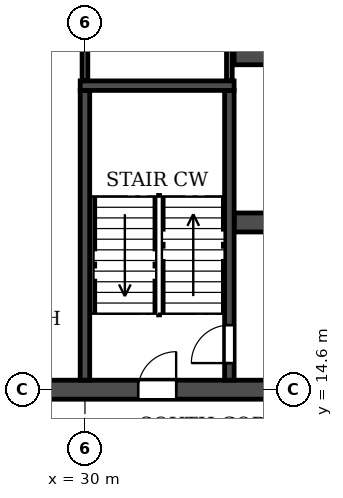
"""IFC4 building model, lengths in metres.
Left out: names, types, materials, properties, quantities, classifications, styles, units other than length and angle.
Written with IfcOpenShell. Run it as: python <this file> out.ifc"""

import sys

from ifc_helpers import new_model, si_unit, direction, frame, frame_2d, origin, place, context, subcontext, project, spatial, rectangle, extrude, element, fill, save


model = new_model("IFC4")
c1 = context("Model", 3, precision=1e-05, world=origin(), true_north=direction((0.0, 1.0)))
c2 = subcontext(c1, "Body", "Model", "MODEL_VIEW")
j1 = project(units=[si_unit("LENGTHUNIT", "METRE"), si_unit("PLANEANGLEUNIT", "RADIAN")], contexts=[c1])
p1 = place(None, origin())
s1 = spatial("IfcSite", under=j1, at=p1, CompositionType="ELEMENT")
p2 = place(p1, origin())
s2 = spatial("IfcBuilding", under=s1, at=p2, CompositionType="ELEMENT")
p3 = place(p2, frame((0.0, 0.0, 72.9)))
s3 = spatial("IfcBuildingStorey", under=s2, at=p3, CompositionType="ELEMENT", Elevation=72.9)
p4 = place(p3, frame((8.6, 14.6, 0.0), z_axis=(0.0, 0.0, 1.0), x_axis=(1.0, 0.0, 0.0)))
e1 = element("IfcWall", 1, at=p4, inside=s3, PredefinedType="SOLIDWALL", context=c2, shape_type="SweptSolid", body=[
    extrude(rectangle(XDim=84.8, YDim=0.5, at=frame_2d((42.4, 0.0))), origin(), (0.0, 0.0, 1.0), 3.06),
])
p5 = place(p4, frame((2.25, 0.0, 0.0)))
e2 = element("IfcOpeningElement", 2, at=p5, cuts=e1, PredefinedType="OPENING", context=c2, shape_type="SweptSolid", body=[
    extrude(rectangle(XDim=1.0, YDim=2.1, at=frame_2d((0.5, 1.05))), frame((0.0, 0.26, 0.0), z_axis=(0.0, -1.0, 0.0), x_axis=(1.0, 0.0, 0.0)), (0.0, 0.0, 1.0), 0.52),
])
p6 = place(p4, frame((6.95, 0.0, 0.0)))
e3 = element("IfcOpeningElement", 3, at=p6, cuts=e1, PredefinedType="OPENING", context=c2, shape_type="SweptSolid", body=[
    extrude(rectangle(XDim=1.0, YDim=2.1, at=frame_2d((0.5, 1.05))), frame((0.0, 0.26, 0.0), z_axis=(0.0, -1.0, 0.0), x_axis=(1.0, 0.0, 0.0)), (0.0, 0.0, 1.0), 0.52),
])
p7 = place(p4, frame((10.3, 0.0, 0.0)))
e4 = element("IfcOpeningElement", 4, at=p7, cuts=e1, PredefinedType="OPENING", context=c2, shape_type="SweptSolid", body=[
    extrude(rectangle(XDim=1.0, YDim=2.1, at=frame_2d((0.5, 1.05))), frame((0.0, 0.26, 0.0), z_axis=(0.0, -1.0, 0.0), x_axis=(1.0, 0.0, 0.0)), (0.0, 0.0, 1.0), 0.52),
])
p8 = place(p4, frame((18.2, 0.0, 0.0)))
e5 = element("IfcOpeningElement", 5, at=p8, cuts=e1, PredefinedType="OPENING", context=c2, shape_type="SweptSolid", body=[
    extrude(rectangle(XDim=1.0, YDim=2.1, at=frame_2d((0.5, 1.05))), frame((0.0, 0.26, 0.0), z_axis=(0.0, -1.0, 0.0), x_axis=(1.0, 0.0, 0.0)), (0.0, 0.0, 1.0), 0.52),
])
p9 = place(p4, frame((22.8, 0.0, 0.0)))
e6 = element("IfcOpeningElement", 6, at=p9, cuts=e1, PredefinedType="OPENING", context=c2, shape_type="SweptSolid", body=[
    extrude(rectangle(XDim=1.0, YDim=2.1, at=frame_2d((0.5, 1.05))), frame((0.0, 0.26, 0.0), z_axis=(0.0, -1.0, 0.0), x_axis=(1.0, 0.0, 0.0)), (0.0, 0.0, 1.0), 0.52),
])
p10 = place(p4, frame((35.4, 0.0, 0.0)))
e7 = element("IfcOpeningElement", 7, at=p10, cuts=e1, PredefinedType="OPENING", context=c2, shape_type="SweptSolid", body=[
    extrude(rectangle(XDim=1.0, YDim=2.1, at=frame_2d((0.5, 1.05))), frame((0.0, 0.26, 0.0), z_axis=(0.0, -1.0, 0.0), x_axis=(1.0, 0.0, 0.0)), (0.0, 0.0, 1.0), 0.52),
])
p11 = place(p4, frame((39.3, 0.0, 0.0)))
e8 = element("IfcOpeningElement", 8, at=p11, cuts=e1, PredefinedType="OPENING", context=c2, shape_type="SweptSolid", body=[
    extrude(rectangle(XDim=1.0, YDim=2.1, at=frame_2d((0.5, 1.05))), frame((0.0, 0.26, 0.0), z_axis=(0.0, -1.0, 0.0), x_axis=(1.0, 0.0, 0.0)), (0.0, 0.0, 1.0), 0.52),
])
p12 = place(p4, frame((41.9, 0.0, 0.0)))
e9 = element("IfcOpeningElement", 9, at=p12, cuts=e1, PredefinedType="OPENING", context=c2, shape_type="SweptSolid", body=[
    extrude(rectangle(XDim=1.0, YDim=2.1, at=frame_2d((0.5, 1.05))), frame((0.0, 0.26, 0.0), z_axis=(0.0, -1.0, 0.0), x_axis=(1.0, 0.0, 0.0)), (0.0, 0.0, 1.0), 0.52),
])
p13 = place(p4, frame((44.5, 0.0, 0.0)))
e10 = element("IfcOpeningElement", 10, at=p13, cuts=e1, PredefinedType="OPENING", context=c2, shape_type="SweptSolid", body=[
    extrude(rectangle(XDim=1.0, YDim=2.1, at=frame_2d((0.5, 1.05))), frame((0.0, 0.26, 0.0), z_axis=(0.0, -1.0, 0.0), x_axis=(1.0, 0.0, 0.0)), (0.0, 0.0, 1.0), 0.52),
])
p14 = place(p4, frame((48.4, 0.0, 0.0)))
e11 = element("IfcOpeningElement", 11, at=p14, cuts=e1, PredefinedType="OPENING", context=c2, shape_type="SweptSolid", body=[
    extrude(rectangle(XDim=1.0, YDim=2.1, at=frame_2d((0.5, 1.05))), frame((0.0, 0.26, 0.0), z_axis=(0.0, -1.0, 0.0), x_axis=(1.0, 0.0, 0.0)), (0.0, 0.0, 1.0), 0.52),
])
p15 = place(p4, frame((61.0, 0.0, 0.0)))
e12 = element("IfcOpeningElement", 12, at=p15, cuts=e1, PredefinedType="OPENING", context=c2, shape_type="SweptSolid", body=[
    extrude(rectangle(XDim=1.0, YDim=2.1, at=frame_2d((0.5, 1.05))), frame((0.0, 0.26, 0.0), z_axis=(0.0, -1.0, 0.0), x_axis=(1.0, 0.0, 0.0)), (0.0, 0.0, 1.0), 0.52),
])
p16 = place(p4, frame((65.6, 0.0, 0.0)))
e13 = element("IfcOpeningElement", 13, at=p16, cuts=e1, PredefinedType="OPENING", context=c2, shape_type="SweptSolid", body=[
    extrude(rectangle(XDim=1.0, YDim=2.1, at=frame_2d((0.5, 1.05))), frame((0.0, 0.26, 0.0), z_axis=(0.0, -1.0, 0.0), x_axis=(1.0, 0.0, 0.0)), (0.0, 0.0, 1.0), 0.52),
])
p17 = place(p4, frame((73.5, 0.0, 0.0)))
e14 = element("IfcOpeningElement", 14, at=p17, cuts=e1, PredefinedType="OPENING", context=c2, shape_type="SweptSolid", body=[
    extrude(rectangle(XDim=1.0, YDim=2.1, at=frame_2d((0.5, 1.05))), frame((0.0, 0.26, 0.0), z_axis=(0.0, -1.0, 0.0), x_axis=(1.0, 0.0, 0.0)), (0.0, 0.0, 1.0), 0.52),
])
p18 = place(p4, frame((76.55, 0.0, 0.0)))
e15 = element("IfcOpeningElement", 15, at=p18, cuts=e1, PredefinedType="OPENING", context=c2, shape_type="SweptSolid", body=[
    extrude(rectangle(XDim=1.0, YDim=2.1, at=frame_2d((0.5, 1.05))), frame((0.0, 0.26, 0.0), z_axis=(0.0, -1.0, 0.0), x_axis=(1.0, 0.0, 0.0)), (0.0, 0.0, 1.0), 0.52),
])
p19 = place(p4, frame((81.0, 0.0, 0.0)))
e16 = element("IfcOpeningElement", 16, at=p19, cuts=e1, PredefinedType="OPENING", context=c2, shape_type="SweptSolid", body=[
    extrude(rectangle(XDim=1.5, YDim=2.1, at=frame_2d((0.75, 1.05))), frame((0.0, 0.26, 0.0), z_axis=(0.0, -1.0, 0.0), x_axis=(1.0, 0.0, 0.0)), (0.0, 0.0, 1.0), 0.52),
])
p20 = place(p3, frame((33.925, 19.0, 0.0), z_axis=(0.0, 0.0, 1.0), x_axis=(1.0, 0.0, 0.0)))
e17 = element("IfcWall", 17, at=p20, inside=s3, PredefinedType="SOLIDWALL", context=c2, shape_type="SweptSolid", body=[
    extrude(rectangle(XDim=34.15, YDim=0.5, at=frame_2d((17.075, 0.0))), origin(), (0.0, 0.0, 1.0), 3.06),
])
p21 = place(p20, frame((16.175, 0.0, 0.0)))
e18 = element("IfcOpeningElement", 18, at=p21, cuts=e17, PredefinedType="OPENING", context=c2, shape_type="SweptSolid", body=[
    extrude(rectangle(XDim=1.8, YDim=2.1, at=frame_2d((0.9, 1.05))), frame((0.0, 0.26, 0.0), z_axis=(0.0, -1.0, 0.0), x_axis=(1.0, 0.0, 0.0)), (0.0, 0.0, 1.0), 0.52),
])
p22 = place(p20, frame((1.525, 0.0, 0.0)))
e19 = element("IfcOpeningElement", 19, at=p22, cuts=e17, PredefinedType="OPENING", context=c2, shape_type="SweptSolid", body=[
    extrude(rectangle(XDim=1.8, YDim=2.1, at=frame_2d((0.9, 1.05))), frame((0.0, 0.26, 0.0), z_axis=(0.0, -1.0, 0.0), x_axis=(1.0, 0.0, 0.0)), (0.0, 0.0, 1.0), 0.52),
])
p23 = place(p20, frame((8.725, 0.0, 0.0)))
e20 = element("IfcOpeningElement", 20, at=p23, cuts=e17, PredefinedType="OPENING", context=c2, shape_type="SweptSolid", body=[
    extrude(rectangle(XDim=1.1, YDim=2.1, at=frame_2d((0.55, 1.05))), frame((0.0, 0.26, 0.0), z_axis=(0.0, -1.0, 0.0), x_axis=(1.0, 0.0, 0.0)), (0.0, 0.0, 1.0), 0.52),
])
p24 = place(p20, frame((11.325, 0.0, 0.0)))
e21 = element("IfcOpeningElement", 21, at=p24, cuts=e17, PredefinedType="OPENING", context=c2, shape_type="SweptSolid", body=[
    extrude(rectangle(XDim=1.1, YDim=2.1, at=frame_2d((0.55, 1.05))), frame((0.0, 0.26, 0.0), z_axis=(0.0, -1.0, 0.0), x_axis=(1.0, 0.0, 0.0)), (0.0, 0.0, 1.0), 0.52),
])
p25 = place(p20, frame((13.925, 0.0, 0.0)))
e22 = element("IfcOpeningElement", 22, at=p25, cuts=e17, PredefinedType="OPENING", context=c2, shape_type="SweptSolid", body=[
    extrude(rectangle(XDim=1.1, YDim=2.1, at=frame_2d((0.55, 1.05))), frame((0.0, 0.26, 0.0), z_axis=(0.0, -1.0, 0.0), x_axis=(1.0, 0.0, 0.0)), (0.0, 0.0, 1.0), 0.52),
])
p26 = place(p20, frame((19.125, 0.0, 0.0)))
e23 = element("IfcOpeningElement", 23, at=p26, cuts=e17, PredefinedType="OPENING", context=c2, shape_type="SweptSolid", body=[
    extrude(rectangle(XDim=1.1, YDim=2.1, at=frame_2d((0.55, 1.05))), frame((0.0, 0.26, 0.0), z_axis=(0.0, -1.0, 0.0), x_axis=(1.0, 0.0, 0.0)), (0.0, 0.0, 1.0), 0.52),
])
p27 = place(p20, frame((21.725, 0.0, 0.0)))
e24 = element("IfcOpeningElement", 24, at=p27, cuts=e17, PredefinedType="OPENING", context=c2, shape_type="SweptSolid", body=[
    extrude(rectangle(XDim=1.1, YDim=2.1, at=frame_2d((0.55, 1.05))), frame((0.0, 0.26, 0.0), z_axis=(0.0, -1.0, 0.0), x_axis=(1.0, 0.0, 0.0)), (0.0, 0.0, 1.0), 0.52),
])
p28 = place(p20, frame((24.325, 0.0, 0.0)))
e25 = element("IfcOpeningElement", 25, at=p28, cuts=e17, PredefinedType="OPENING", context=c2, shape_type="SweptSolid", body=[
    extrude(rectangle(XDim=1.1, YDim=2.1, at=frame_2d((0.55, 1.05))), frame((0.0, 0.26, 0.0), z_axis=(0.0, -1.0, 0.0), x_axis=(1.0, 0.0, 0.0)), (0.0, 0.0, 1.0), 0.52),
])
p29 = place(p20, frame((30.825, 0.0, 0.0)))
e26 = element("IfcOpeningElement", 26, at=p29, cuts=e17, PredefinedType="OPENING", context=c2, shape_type="SweptSolid", body=[
    extrude(rectangle(XDim=1.8, YDim=2.1, at=frame_2d((0.9, 1.05))), frame((0.0, 0.26, 0.0), z_axis=(0.0, -1.0, 0.0), x_axis=(1.0, 0.0, 0.0)), (0.0, 0.0, 1.0), 0.52),
])
p30 = place(p3, frame((33.925, 23.4, 0.0), z_axis=(0.0, 0.0, 1.0), x_axis=(1.0, 0.0, 0.0)))
e27 = element("IfcWall", 27, at=p30, inside=s3, PredefinedType="SOLIDWALL", context=c2, shape_type="SweptSolid", body=[
    extrude(rectangle(XDim=34.15, YDim=0.5, at=frame_2d((17.075, 0.0))), origin(), (0.0, 0.0, 1.0), 3.06),
])
p31 = place(p30, frame((16.175, 0.0, 0.0)))
e28 = element("IfcOpeningElement", 28, at=p31, cuts=e27, PredefinedType="OPENING", context=c2, shape_type="SweptSolid", body=[
    extrude(rectangle(XDim=1.8, YDim=2.1, at=frame_2d((0.9, 1.05))), frame((0.0, 0.26, 0.0), z_axis=(0.0, -1.0, 0.0), x_axis=(1.0, 0.0, 0.0)), (0.0, 0.0, 1.0), 0.52),
])
p32 = place(p30, frame((11.025, 0.0, 0.0)))
e29 = element("IfcOpeningElement", 29, at=p32, cuts=e27, PredefinedType="OPENING", context=c2, shape_type="SweptSolid", body=[
    extrude(rectangle(XDim=1.1, YDim=2.1, at=frame_2d((0.55, 1.05))), frame((0.0, 0.26, 0.0), z_axis=(0.0, -1.0, 0.0), x_axis=(1.0, 0.0, 0.0)), (0.0, 0.0, 1.0), 0.52),
])
p33 = place(p3, frame((30.0, 14.85, 0.0), z_axis=(0.0, 0.0, 1.0), x_axis=(0.0, 1.0, 0.0)))
e30 = element("IfcWall", 30, at=p33, inside=s3, PredefinedType="SOLIDWALL", context=c2, shape_type="SweptSolid", body=[
    extrude(rectangle(XDim=7.625, YDim=0.25, at=frame_2d((3.812, 0.0))), origin(), (0.0, 0.0, 1.0), 3.06),
])
p34 = place(p3, frame((33.8, 14.85, 0.0), z_axis=(0.0, 0.0, 1.0), x_axis=(0.0, 1.0, 0.0)))
e31 = element("IfcWall", 31, at=p34, inside=s3, PredefinedType="SOLIDWALL", context=c2, shape_type="SweptSolid", body=[
    extrude(rectangle(XDim=7.625, YDim=0.25, at=frame_2d((3.812, 0.0))), origin(), (0.0, 0.0, 1.0), 3.06),
])
p35 = place(p34, frame((0.45, 0.0, 0.0)))
e32 = element("IfcOpeningElement", 32, at=p35, cuts=e31, PredefinedType="OPENING", context=c2, shape_type="SweptSolid", body=[
    extrude(rectangle(XDim=1.0, YDim=2.1, at=frame_2d((0.5, 1.05))), frame((0.0, 0.135, 0.0), z_axis=(0.0, -1.0, 0.0), x_axis=(1.0, 0.0, 0.0)), (0.0, 0.0, 1.0), 0.27),
])
p36 = place(p3, frame((29.875, 22.6, 0.0), z_axis=(0.0, 0.0, 1.0), x_axis=(1.0, 0.0, 0.0)))
e33 = element("IfcWall", 33, at=p36, inside=s3, PredefinedType="SOLIDWALL", context=c2, shape_type="SweptSolid", body=[
    extrude(rectangle(XDim=4.05, YDim=0.25, at=frame_2d((2.025, 0.0))), origin(), (0.0, 0.0, 1.0), 3.06),
])
for number, where, z_axis, x_axis in (
    (34, (30.0, 22.735, 0.0), (0.0, 0.0, 1.0), (0.0, 1.0, 0.0)),
    (35, (33.8, 22.735, 0.0), (0.0, 0.0, 1.0), (0.0, 1.0, 0.0)),
):
    element("IfcWall", number, at=place(p3, frame(where, z_axis=z_axis, x_axis=x_axis)), inside=s3, PredefinedType="PARTITIONING", context=c2, shape_type="SweptSolid", body=[
        extrude(rectangle(XDim=4.805, YDim=0.15, at=frame_2d((2.402, 0.0))), origin(), (0.0, 0.0, 1.0), 3.06),
    ])
p37 = place(p9, origin())
e36 = element("IfcDoor", 36, at=p37, inside=s3, OperationType="SINGLE_SWING_RIGHT", PredefinedType="DOOR", context=c2, shape_type="SweptSolid", body=[
    extrude(rectangle(XDim=1.0, YDim=2.1, at=frame_2d((0.5, 1.05))), frame((0.0, 0.025, 0.0), z_axis=(0.0, -1.0, 0.0), x_axis=(1.0, 0.0, 0.0)), (0.0, 0.0, 1.0), 0.05),
])
fill(e6, e36)
p38 = place(p35, origin())
e37 = element("IfcDoor", 37, at=p38, inside=s3, OperationType="SINGLE_SWING_LEFT", PredefinedType="DOOR", context=c2, shape_type="SweptSolid", body=[
    extrude(rectangle(XDim=1.0, YDim=2.1, at=frame_2d((0.5, 1.05))), frame((0.0, 0.025, 0.0), z_axis=(0.0, -1.0, 0.0), x_axis=(1.0, 0.0, 0.0)), (0.0, 0.0, 1.0), 0.05),
])
fill(e32, e37)
save(model, sys.argv[1])
